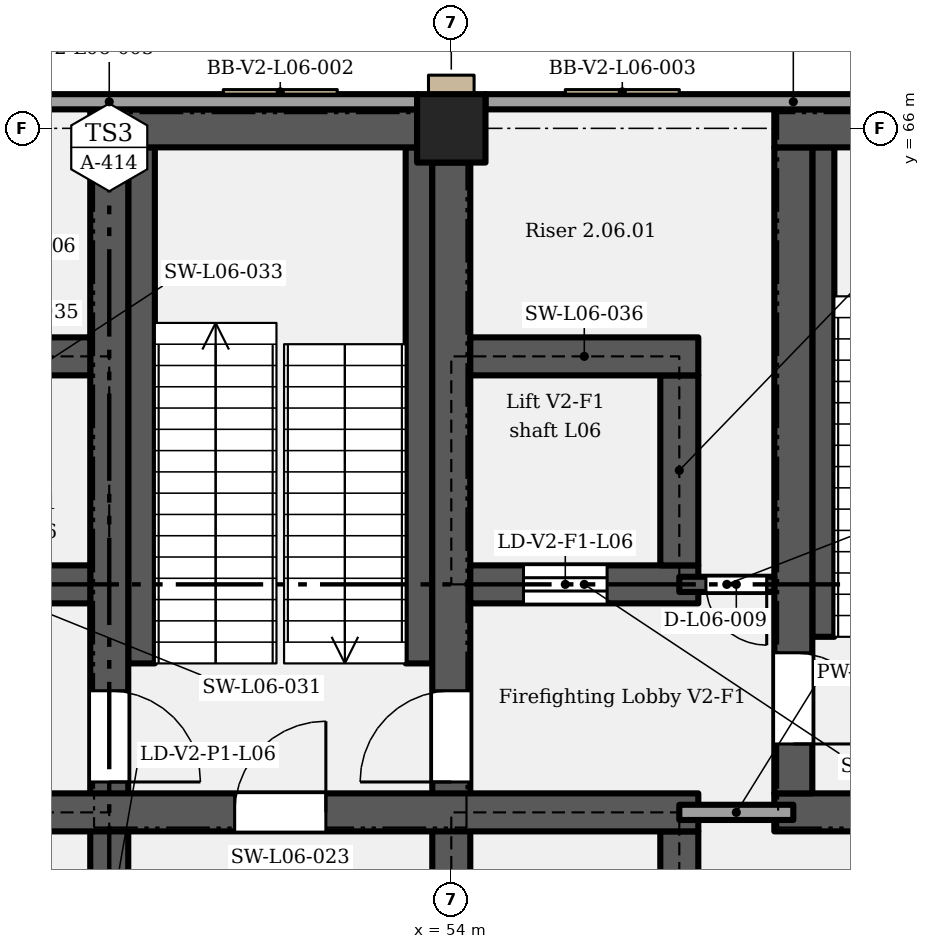
"""IFC4 building model, lengths in metres.
Left out: names, types, materials, properties, quantities, classifications, styles, units other than length and angle.
Written with IfcOpenShell. Run it as: python <this file> out.ifc"""

import sys

from ifc_helpers import new_model, si_unit, direction, frame, frame_2d, origin, origin_2d, place, context, subcontext, project, spatial, rectangle, extrude, element, fill, save


model = new_model("IFC4")
c1 = context("Model", 3, precision=1e-05, world=origin(), true_north=direction((0.0, 1.0)))
c2 = subcontext(c1, "Body", "Model", "MODEL_VIEW")
j1 = project(units=[si_unit("LENGTHUNIT", "METRE"), si_unit("PLANEANGLEUNIT", "RADIAN")], contexts=[c1])
p1 = place(None, origin())
s1 = spatial("IfcSite", under=j1, at=p1, CompositionType="ELEMENT")
p2 = place(p1, origin())
s2 = spatial("IfcBuilding", under=s1, at=p2, CompositionType="ELEMENT")
p3 = place(p2, frame((0.0, 0.0, 33.6)))
s3 = spatial("IfcBuildingStorey", under=s2, at=p3, CompositionType="ELEMENT", Elevation=33.6)
p4 = place(p3, frame((54.0, 66.0, 0.0), z_axis=(0.0, 0.0, 1.0), x_axis=(1.0, 0.0, 0.0)))
e1 = element("IfcColumn", 1, at=p4, inside=s3, PredefinedType="COLUMN", context=c2, shape_type="SweptSolid", body=[
    extrude(rectangle(XDim=0.9, YDim=0.9, at=origin_2d()), origin(), (0.0, 0.0, 1.0), 5.4),
])
p5 = place(p3, frame((49.5, 54.25, 0.0), z_axis=(0.0, 0.0, 1.0), x_axis=(0.0, 1.0, 0.0)))
e2 = element("IfcWall", 2, at=p5, inside=s3, PredefinedType="SHEAR", context=c2, shape_type="SweptSolid", body=[
    extrude(rectangle(XDim=11.5, YDim=0.5, at=frame_2d((5.75, 0.0))), origin(), (0.0, 0.0, 1.0), 5.15),
])
p6 = place(p5, frame((0.7, 0.0, 0.0)))
e3 = element("IfcOpeningElement", 3, at=p6, cuts=e2, PredefinedType="OPENING", context=c2, shape_type="SweptSolid", body=[
    extrude(rectangle(XDim=1.1, YDim=2.1, at=frame_2d((0.55, 1.05))), frame((0.0, 0.26, 0.0), z_axis=(0.0, -1.0, 0.0), x_axis=(1.0, 0.0, 0.0)), (0.0, 0.0, 1.0), 0.52),
])
p7 = place(p5, frame((4.35, 0.0, 0.0), z_axis=(0.0, 0.0, 1.0), x_axis=(-1.0, 0.0, 0.0)))
e4 = element("IfcOpeningElement", 4, at=p7, cuts=e2, PredefinedType="OPENING", context=c2, shape_type="SweptSolid", body=[
    extrude(rectangle(XDim=1.2, YDim=2.1, at=frame_2d((0.6, 1.05))), frame((0.0, 0.26, 0.0), z_axis=(0.0, -1.0, 0.0), x_axis=(1.0, 0.0, 0.0)), (0.0, 0.0, 1.0), 0.52),
])
p8 = place(p3, frame((57.0, 54.25, 0.0), z_axis=(0.0, 0.0, 1.0), x_axis=(0.0, 1.0, 0.0)))
e5 = element("IfcWall", 5, at=p8, inside=s3, PredefinedType="SHEAR", context=c2, shape_type="SweptSolid", body=[
    extrude(rectangle(XDim=2.5, YDim=0.5, at=frame_2d((1.25, 0.0))), origin(), (0.0, 0.0, 1.0), 5.15),
])
p9 = place(p3, frame((54.0, 54.45, 0.0), z_axis=(0.0, 0.0, 1.0), x_axis=(0.0, 1.0, 0.0)))
e6 = element("IfcWall", 6, at=p9, inside=s3, PredefinedType="SHEAR", context=c2, shape_type="SweptSolid", body=[
    extrude(rectangle(XDim=11.1, YDim=0.5, at=frame_2d((5.55, 0.0))), origin(), (0.0, 0.0, 1.0), 5.15),
])
p10 = place(p9, frame((0.5, 0.0, 0.0)))
e7 = element("IfcOpeningElement", 7, at=p10, cuts=e6, PredefinedType="OPENING", context=c2, shape_type="SweptSolid", body=[
    extrude(rectangle(XDim=1.1, YDim=2.1, at=frame_2d((0.55, 1.05))), frame((0.0, 0.26, 0.0), z_axis=(0.0, -1.0, 0.0), x_axis=(1.0, 0.0, 0.0)), (0.0, 0.0, 1.0), 0.52),
])
p11 = place(p9, frame((2.95, 0.0, 0.0)))
e8 = element("IfcOpeningElement", 8, at=p11, cuts=e6, PredefinedType="OPENING", context=c2, shape_type="SweptSolid", body=[
    extrude(rectangle(XDim=1.2, YDim=2.1, at=frame_2d((0.6, 1.05))), frame((0.0, 0.26, 0.0), z_axis=(0.0, -1.0, 0.0), x_axis=(1.0, 0.0, 0.0)), (0.0, 0.0, 1.0), 0.52),
])
p12 = place(p3, frame((46.25, 57.0, 0.0), z_axis=(0.0, 0.0, 1.0), x_axis=(1.0, 0.0, 0.0)))
e9 = element("IfcWall", 9, at=p12, inside=s3, PredefinedType="SHEAR", context=c2, shape_type="SweptSolid", body=[
    extrude(rectangle(XDim=11.0, YDim=0.5, at=frame_2d((5.5, 0.0))), origin(), (0.0, 0.0, 1.0), 5.15),
])
p13 = place(p12, frame((4.9, 0.0, 0.0)))
e10 = element("IfcOpeningElement", 10, at=p13, cuts=e9, PredefinedType="OPENING", context=c2, shape_type="SweptSolid", body=[
    extrude(rectangle(XDim=1.2, YDim=2.1, at=frame_2d((0.6, 1.05))), frame((0.0, 0.26, 0.0), z_axis=(0.0, -1.0, 0.0), x_axis=(1.0, 0.0, 0.0)), (0.0, 0.0, 1.0), 0.52),
])
p14 = place(p3, frame((58.25, 57.0, 0.0), z_axis=(0.0, 0.0, 1.0), x_axis=(1.0, 0.0, 0.0)))
e11 = element("IfcWall", 11, at=p14, inside=s3, PredefinedType="SHEAR", context=c2, shape_type="SweptSolid", body=[
    extrude(rectangle(XDim=5.0, YDim=0.5, at=frame_2d((2.5, 0.0))), origin(), (0.0, 0.0, 1.0), 5.15),
])
p15 = place(p14, frame((2.0, 0.0, 0.0)))
e12 = element("IfcOpeningElement", 12, at=p15, cuts=e11, PredefinedType="OPENING", context=c2, shape_type="SweptSolid", body=[
    extrude(rectangle(XDim=1.0, YDim=2.1, at=frame_2d((0.5, 1.05))), frame((0.0, 0.26, 0.0), z_axis=(0.0, -1.0, 0.0), x_axis=(1.0, 0.0, 0.0)), (0.0, 0.0, 1.0), 0.52),
])
p16 = place(p3, frame((58.5, 57.25, 0.0), z_axis=(0.0, 0.0, 1.0), x_axis=(0.0, 1.0, 0.0)))
e13 = element("IfcWall", 13, at=p16, inside=s3, PredefinedType="SHEAR", context=c2, shape_type="SweptSolid", body=[
    extrude(rectangle(XDim=8.5, YDim=0.5, at=frame_2d((4.25, 0.0))), origin(), (0.0, 0.0, 1.0), 5.15),
])
p17 = place(p16, frame((1.85, 0.0, 0.0), z_axis=(0.0, 0.0, 1.0), x_axis=(-1.0, 0.0, 0.0)))
e14 = element("IfcOpeningElement", 14, at=p17, cuts=e13, PredefinedType="OPENING", context=c2, shape_type="SweptSolid", body=[
    extrude(rectangle(XDim=1.2, YDim=2.1, at=frame_2d((0.6, 1.05))), frame((0.0, 0.26, 0.0), z_axis=(0.0, -1.0, 0.0), x_axis=(1.0, 0.0, 0.0)), (0.0, 0.0, 1.0), 0.52),
])
p18 = place(p3, frame((46.25, 60.0, 0.0), z_axis=(0.0, 0.0, 1.0), x_axis=(1.0, 0.0, 0.0)))
e15 = element("IfcWall", 15, at=p18, inside=s3, PredefinedType="SHEAR", context=c2, shape_type="SweptSolid", body=[
    extrude(rectangle(XDim=3.0, YDim=0.5, at=frame_2d((1.5, 0.0))), origin(), (0.0, 0.0, 1.0), 5.15),
])
p19 = place(p3, frame((54.25, 60.0, 0.0), z_axis=(0.0, 0.0, 1.0), x_axis=(1.0, 0.0, 0.0)))
e16 = element("IfcWall", 16, at=p19, inside=s3, PredefinedType="SHEAR", context=c2, shape_type="SweptSolid", body=[
    extrude(rectangle(XDim=3.0, YDim=0.5, at=frame_2d((1.5, 0.0))), origin(), (0.0, 0.0, 1.0), 5.15),
])
p20 = place(p19, frame((0.7, 0.0, 0.0)))
e17 = element("IfcOpeningElement", 17, at=p20, cuts=e16, PredefinedType="OPENING", context=c2, shape_type="SweptSolid", body=[
    extrude(rectangle(XDim=1.1, YDim=2.1, at=frame_2d((0.55, 1.05))), frame((0.0, 0.26, 0.0), z_axis=(0.0, -1.0, 0.0), x_axis=(1.0, 0.0, 0.0)), (0.0, 0.0, 1.0), 0.52),
])
p21 = place(p3, frame((57.0, 60.25, 0.0), z_axis=(0.0, 0.0, 1.0), x_axis=(0.0, 1.0, 0.0)))
e18 = element("IfcWall", 18, at=p21, inside=s3, PredefinedType="SHEAR", context=c2, shape_type="SweptSolid", body=[
    extrude(rectangle(XDim=2.5, YDim=0.5, at=frame_2d((1.25, 0.0))), origin(), (0.0, 0.0, 1.0), 5.15),
])
for number, where, z_axis, x_axis in (
    (19, (46.25, 63.0, 0.0), (0.0, 0.0, 1.0), (1.0, 0.0, 0.0)),
    (20, (54.25, 63.0, 0.0), (0.0, 0.0, 1.0), (1.0, 0.0, 0.0)),
):
    element("IfcWall", number, at=place(p3, frame(where, z_axis=z_axis, x_axis=x_axis)), inside=s3, PredefinedType="SHEAR", context=c2, shape_type="SweptSolid", body=[
        extrude(rectangle(XDim=3.0, YDim=0.5, at=frame_2d((1.5, 0.0))), origin(), (0.0, 0.0, 1.0), 5.15),
    ])
for number, where, z_axis, x_axis in (
    (21, (49.25, 66.0, 0.0), (0.0, 0.0, 1.0), (1.0, 0.0, 0.0)),
    (22, (58.25, 66.0, 0.0), (0.0, 0.0, 1.0), (1.0, 0.0, 0.0)),
):
    element("IfcWall", number, at=place(p3, frame(where, z_axis=z_axis, x_axis=x_axis)), inside=s3, PredefinedType="SHEAR", context=c2, shape_type="SweptSolid", body=[
        extrude(rectangle(XDim=4.3, YDim=0.5, at=frame_2d((2.15, 0.0))), origin(), (0.0, 0.0, 1.0), 5.15),
    ])
p22 = place(p3, frame((45.45, 66.35, 0.0), z_axis=(0.0, 0.0, 1.0), x_axis=(1.0, 0.0, 0.0)))
e23 = element("IfcWall", 23, at=p22, inside=s3, PredefinedType="SOLIDWALL", context=c2, shape_type="SweptSolid", body=[
    extrude(rectangle(XDim=8.1, YDim=0.2, at=frame_2d((4.05, 0.0))), origin(), (0.0, 0.0, 1.0), 5.15),
])
p23 = place(p22, frame((1.05, 0.0, 1.05)))
e24 = element("IfcOpeningElement", 24, at=p23, cuts=e23, PredefinedType="OPENING", context=c2, shape_type="SweptSolid", body=[
    extrude(rectangle(XDim=1.5, YDim=3.5, at=frame_2d((0.75, 1.75))), frame((0.0, 0.11, 0.0), z_axis=(0.0, -1.0, 0.0), x_axis=(1.0, 0.0, 0.0)), (0.0, 0.0, 1.0), 0.22),
])
p24 = place(p3, frame((54.45, 66.35, 0.0), z_axis=(0.0, 0.0, 1.0), x_axis=(1.0, 0.0, 0.0)))
e25 = element("IfcWall", 25, at=p24, inside=s3, PredefinedType="SOLIDWALL", context=c2, shape_type="SweptSolid", body=[
    extrude(rectangle(XDim=8.1, YDim=0.2, at=frame_2d((4.05, 0.0))), origin(), (0.0, 0.0, 1.0), 5.15),
])
p25 = place(p3, frame((57.0, 57.0, 0.0), z_axis=(0.0, 0.0, 1.0), x_axis=(1.0, 0.0, 0.0)))
e26 = element("IfcWall", 26, at=p25, inside=s3, PredefinedType="PARTITIONING", context=c2, shape_type="SweptSolid", body=[
    extrude(rectangle(XDim=1.5, YDim=0.2, at=frame_2d((0.75, 0.0))), origin(), (0.0, 0.0, 1.0), 5.15),
])
p26 = place(p3, frame((57.0, 60.0, 0.0), z_axis=(0.0, 0.0, 1.0), x_axis=(1.0, 0.0, 0.0)))
e27 = element("IfcWall", 27, at=p26, inside=s3, PredefinedType="SHEAR", context=c2, shape_type="SweptSolid", body=[
    extrude(rectangle(XDim=1.25, YDim=0.2, at=frame_2d((0.625, 0.0))), origin(), (0.0, 0.0, 1.0), 5.15),
])
p27 = place(p26, frame((1.15, 0.0, 0.0), z_axis=(0.0, 0.0, 1.0), x_axis=(-1.0, 0.0, 0.0)))
e28 = element("IfcOpeningElement", 28, at=p27, cuts=e27, PredefinedType="OPENING", context=c2, shape_type="SweptSolid", body=[
    extrude(rectangle(XDim=0.8, YDim=2.0, at=frame_2d((0.4, 1.0))), frame((0.0, 0.11, 0.0), z_axis=(0.0, -1.0, 0.0), x_axis=(1.0, 0.0, 0.0)), (0.0, 0.0, 1.0), 0.22),
])
p28 = place(p3, frame((49.925, 58.96, 0.0), z_axis=(0.0, 0.0, 1.0), x_axis=(0.0, 1.0, 0.0)))
e29 = element("IfcWall", 29, at=p28, inside=s3, PredefinedType="SHEAR", context=c2, shape_type="SweptSolid", body=[
    extrude(rectangle(XDim=6.79, YDim=0.35, at=frame_2d((3.395, 0.0))), origin(), (0.0, 0.0, 1.0), 2.587),
])
p29 = place(p3, frame((53.575, 58.96, 0.0), z_axis=(0.0, 0.0, 1.0), x_axis=(0.0, 1.0, 0.0)))
e30 = element("IfcWall", 30, at=p29, inside=s3, PredefinedType="SHEAR", context=c2, shape_type="SweptSolid", body=[
    extrude(rectangle(XDim=6.79, YDim=0.35, at=frame_2d((3.395, 0.0))), origin(), (0.0, 0.0, 1.0), 5.15),
])
p30 = place(p3, frame((58.895, 59.31, 0.0), z_axis=(0.0, 0.0, 1.0), x_axis=(0.0, 1.0, 0.0)))
e31 = element("IfcWall", 31, at=p30, inside=s3, PredefinedType="SHEAR", context=c2, shape_type="SweptSolid", body=[
    extrude(rectangle(XDim=6.44, YDim=0.29, at=frame_2d((3.22, 0.0))), origin(), (0.0, 0.0, 1.0), 2.587),
])
p31 = place(p13, origin())
e32 = element("IfcDoor", 32, at=p31, inside=s3, OperationType="SINGLE_SWING_RIGHT", PredefinedType="DOOR", context=c2, shape_type="SweptSolid", body=[
    extrude(rectangle(XDim=1.2, YDim=2.1, at=frame_2d((0.6, 1.05))), frame((0.0, 0.025, 0.0), z_axis=(0.0, -1.0, 0.0), x_axis=(1.0, 0.0, 0.0)), (0.0, 0.0, 1.0), 0.05),
])
fill(e10, e32)
p32 = place(p20, origin())
e33 = element("IfcDoor", 33, at=p32, inside=s3, OperationType="SLIDING_TO_LEFT", PredefinedType="DOOR", context=c2, shape_type="SweptSolid", body=[
    extrude(rectangle(XDim=1.1, YDim=2.1, at=frame_2d((0.55, 1.05))), frame((0.0, 0.025, 0.0), z_axis=(0.0, -1.0, 0.0), x_axis=(1.0, 0.0, 0.0)), (0.0, 0.0, 1.0), 0.05),
])
fill(e17, e33)
p33 = place(p11, origin())
e34 = element("IfcDoor", 34, at=p33, inside=s3, OperationType="SINGLE_SWING_LEFT", PredefinedType="DOOR", context=c2, shape_type="SweptSolid", body=[
    extrude(rectangle(XDim=1.2, YDim=2.1, at=frame_2d((0.6, 1.05))), frame((0.0, 0.025, 0.0), z_axis=(0.0, -1.0, 0.0), x_axis=(1.0, 0.0, 0.0)), (0.0, 0.0, 1.0), 0.05),
])
fill(e8, e34)
p34 = place(p17, origin())
e35 = element("IfcDoor", 35, at=p34, inside=s3, OperationType="SINGLE_SWING_RIGHT", PredefinedType="DOOR", context=c2, shape_type="SweptSolid", body=[
    extrude(rectangle(XDim=1.2, YDim=2.1, at=frame_2d((0.6, 1.05))), frame((0.0, 0.025, 0.0), z_axis=(0.0, -1.0, 0.0), x_axis=(1.0, 0.0, 0.0)), (0.0, 0.0, 1.0), 0.05),
])
fill(e14, e35)
p35 = place(p27, origin())
e36 = element("IfcDoor", 36, at=p35, inside=s3, OperationType="SINGLE_SWING_LEFT", PredefinedType="DOOR", context=c2, shape_type="SweptSolid", body=[
    extrude(rectangle(XDim=0.8, YDim=2.0, at=frame_2d((0.4, 1.0))), frame((0.0, 0.025, 0.0), z_axis=(0.0, -1.0, 0.0), x_axis=(1.0, 0.0, 0.0)), (0.0, 0.0, 1.0), 0.05),
])
fill(e28, e36)
p36 = place(p7, origin())
e37 = element("IfcDoor", 37, at=p36, inside=s3, OperationType="SINGLE_SWING_RIGHT", PredefinedType="DOOR", context=c2, shape_type="SweptSolid", body=[
    extrude(rectangle(XDim=1.2, YDim=2.1, at=frame_2d((0.6, 1.05))), frame((0.0, 0.025, 0.0), z_axis=(0.0, -1.0, 0.0), x_axis=(1.0, 0.0, 0.0)), (0.0, 0.0, 1.0), 0.05),
])
fill(e4, e37)
save(model, sys.argv[1])
